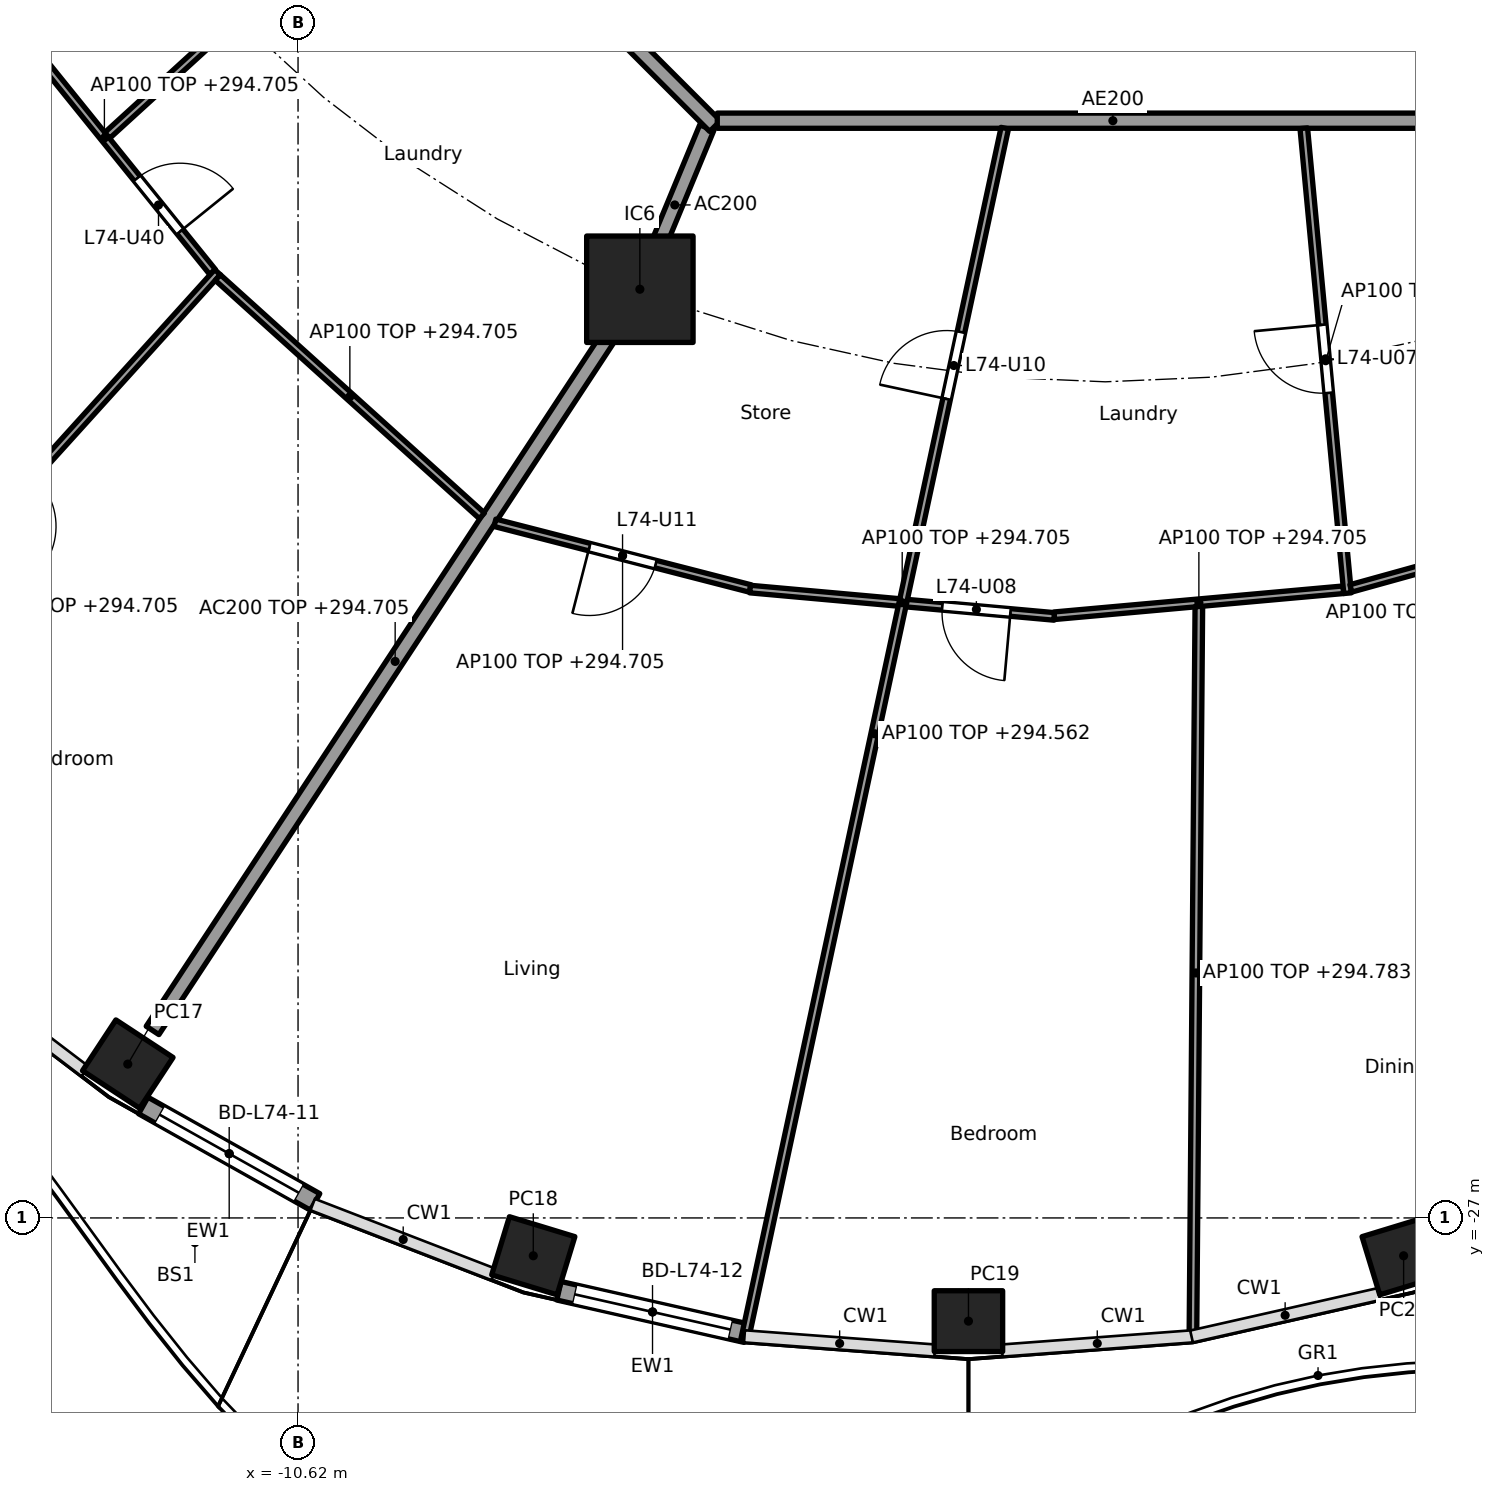
"""IFC4 building model, lengths in metres.
Left out: names, types, materials, properties, quantities, classifications, styles, units other than length and angle.
Written with IfcOpenShell. Run it as: python <this file> out.ifc"""

import sys

from ifc_helpers import new_model, si_unit, direction, frame, frame_2d, origin, origin_2d, place, context, subcontext, project, spatial, rectangle, hollow_rectangle, extrude, element, fill, save


model = new_model("IFC4")
c1 = context("Model", 3, precision=1e-05, world=origin(), true_north=direction((0.0, 1.0)))
c2 = subcontext(c1, "Body", "Model", "MODEL_VIEW")
j1 = project(units=[si_unit("LENGTHUNIT", "METRE"), si_unit("PLANEANGLEUNIT", "RADIAN")], contexts=[c1])
p1 = place(None, origin())
s1 = spatial("IfcSite", under=j1, at=p1, CompositionType="ELEMENT")
p2 = place(p1, origin())
s2 = spatial("IfcBuilding", under=s1, at=p2, CompositionType="ELEMENT")
p3 = place(p2, frame((0.0, 0.0, 291.8)))
s3 = spatial("IfcBuildingStorey", under=s2, at=p3, CompositionType="ELEMENT", Elevation=291.8)
for number, where, z_axis, x_axis in (
    (1, (-12.86, -24.976, 0.0), (0.0, 0.0, 1.0), (0.836, -0.549, 0.0)),
    (2, (-7.525, -27.498, 0.0), (0.0, 0.0, 1.0), (0.957, -0.292, 0.0)),
    (3, (-1.8, -28.358, 0.0), (0.0, 0.0, 1.0), (1.0, 0.0, 0.0)),
    (4, (3.925, -27.498, 0.0), (0.0, 0.0, 1.0), (0.957, 0.292, 0.0)),
):
    element("IfcColumn", number, at=place(p3, frame(where, z_axis=z_axis, x_axis=x_axis)), inside=s3, PredefinedType="COLUMN", context=c2, shape_type="SweptSolid", body=[
        extrude(hollow_rectangle(XDim=0.9, YDim=0.8, WallThickness=0.028, at=origin_2d()), origin(), (0.0, 0.0, 1.0), 3.7),
    ])
p4 = place(p3, frame((-6.123, -14.782, 0.0), z_axis=(0.0, 0.0, 1.0), x_axis=(1.0, 0.0, 0.0)))
e5 = element("IfcColumn", 5, at=p4, inside=s3, PredefinedType="COLUMN", context=c2, shape_type="SweptSolid", body=[
    extrude(rectangle(XDim=1.4, YDim=1.4, at=origin_2d()), origin(), (0.0, 0.0, 1.0), 3.7),
])
p5 = place(p3, frame((-10.395, -26.789, 0.0), z_axis=(0.0, 0.0, 1.0), x_axis=(-0.872115604046, 0.489299880625, 0.0)))
e6 = element("IfcWall", 6, at=p5, inside=s3, PredefinedType="SOLIDWALL", context=c2, shape_type="SweptSolid", body=[
    extrude(rectangle(XDim=2.593, YDim=0.25, at=frame_2d((1.296, 0.0))), origin(), (0.0, 0.0, 1.0), 3.44),
])
p6 = place(p5, frame((0.247, 0.0, 0.0)))
e7 = element("IfcOpeningElement", 7, at=p6, cuts=e6, PredefinedType="OPENING", context=c2, shape_type="SweptSolid", body=[
    extrude(rectangle(XDim=2.1, YDim=2.4, at=frame_2d((1.05, 1.2))), frame((0.0, 0.135, 0.0), z_axis=(0.0, -1.0, 0.0), x_axis=(1.0, 0.0, 0.0)), (0.0, 0.0, 1.0), 0.27),
])
p7 = place(p3, frame((-4.725, -28.516, 0.0), z_axis=(0.0, 0.0, 1.0), x_axis=(-0.975319584032, 0.220797891756, 0.0)))
e8 = element("IfcWall", 8, at=p7, inside=s3, PredefinedType="SOLIDWALL", context=c2, shape_type="SweptSolid", body=[
    extrude(rectangle(XDim=2.525, YDim=0.25, at=frame_2d((1.263, 0.0))), origin(), (0.0, 0.0, 1.0), 3.44),
])
p8 = place(p7, frame((0.213, 0.0, 0.0)))
e9 = element("IfcOpeningElement", 9, at=p8, cuts=e8, PredefinedType="OPENING", context=c2, shape_type="SweptSolid", body=[
    extrude(rectangle(XDim=2.1, YDim=2.4, at=frame_2d((1.05, 1.2))), frame((0.0, 0.135, 0.0), z_axis=(0.0, -1.0, 0.0), x_axis=(1.0, 0.0, 0.0)), (0.0, 0.0, 1.0), 0.27),
])
p9 = place(p3, frame((-5.243, -12.657, 0.0), z_axis=(0.0, 0.0, 1.0), x_axis=(-0.382770106157, -0.923843626288, 0.0)))
e10 = element("IfcWall", 10, at=p9, inside=s3, PredefinedType="PARTITIONING", context=c2, shape_type="SweptSolid", body=[
    extrude(rectangle(XDim=2.199, YDim=0.2, at=frame_2d((1.1, 0.0))), origin(), (0.0, 0.0, 1.0), 3.44),
])
p10 = place(p3, frame((-6.151, -14.824, 0.0), z_axis=(0.0, 0.0, 1.0), x_axis=(-0.549345577828, -0.835595258556, 0.0)))
e11 = element("IfcWall", 11, at=p10, inside=s3, PredefinedType="PARTITIONING", context=c2, shape_type="SweptSolid", body=[
    extrude(rectangle(XDim=11.62, YDim=0.2, at=frame_2d((5.81, 0.0))), origin(), (0.0, 0.0, 1.0), 2.905),
])
p11 = place(p3, frame((-12.635, -5.134, 0.0), z_axis=(0.0, 0.0, 1.0), x_axis=(0.707106781187, -0.707106781187, 0.0)))
e12 = element("IfcWall", 12, at=p11, inside=s3, PredefinedType="PARTITIONING", context=c2, shape_type="SweptSolid", body=[
    extrude(rectangle(XDim=10.609, YDim=0.2, at=frame_2d((5.305, 0.0))), origin(), (0.0, 0.0, 1.0), 3.44),
])
p12 = place(p3, frame((-5.104, -12.565, 0.0), z_axis=(0.0, 0.0, 1.0), x_axis=(1.0, 0.0, 0.0)))
e13 = element("IfcWall", 13, at=p12, inside=s3, PredefinedType="PARTITIONING", context=c2, shape_type="SweptSolid", body=[
    extrude(rectangle(XDim=10.409, YDim=0.2, at=frame_2d((5.205, 0.0))), origin(), (0.0, 0.0, 1.0), 3.44),
])
p13 = place(p3, frame((-14.591, -11.029, 0.0), z_axis=(0.0, 0.0, 1.0), x_axis=(0.628170338674, -0.778075848237, 0.0)))
e14 = element("IfcWall", 14, at=p13, inside=s3, PredefinedType="PARTITIONING", context=c2, shape_type="SweptSolid", body=[
    extrude(rectangle(XDim=4.532, YDim=0.1, at=frame_2d((2.266, 0.0))), origin(), (0.0, 0.0, 1.0), 2.905),
])
p14 = place(p13, frame((2.949, 0.0, 0.0)))
e15 = element("IfcOpeningElement", 15, at=p14, cuts=e14, PredefinedType="OPENING", context=c2, shape_type="SweptSolid", body=[
    extrude(rectangle(XDim=0.9, YDim=2.1, at=frame_2d((0.45, 1.05))), frame((0.0, 0.06, 0.0), z_axis=(0.0, -1.0, 0.0), x_axis=(1.0, 0.0, 0.0)), (0.0, 0.0, 1.0), 0.12),
])
p15 = place(p3, frame((-8.958, -8.952, 0.0), z_axis=(0.0, 0.0, 1.0), x_axis=(-0.73876526954, -0.673962815385, 0.0)))
e16 = element("IfcWall", 16, at=p15, inside=s3, PredefinedType="PARTITIONING", context=c2, shape_type="SweptSolid", body=[
    extrude(rectangle(XDim=5.647, YDim=0.1, at=frame_2d((2.824, 0.0))), origin(), (0.0, 0.0, 1.0), 2.762),
])
p16 = place(p3, frame((-11.679, -14.557, 0.0), z_axis=(0.0, 0.0, 1.0), x_axis=(-0.670800011545, -0.741638284146, 0.0)))
e17 = element("IfcWall", 17, at=p16, inside=s3, PredefinedType="PARTITIONING", context=c2, shape_type="SweptSolid", body=[
    extrude(rectangle(XDim=8.068, YDim=0.1, at=frame_2d((4.034, 0.0))), origin(), (0.0, 0.0, 1.0), 2.905),
])
p17 = place(p16, frame((3.609, 0.0, 0.0)))
e18 = element("IfcOpeningElement", 18, at=p17, cuts=e17, PredefinedType="OPENING", context=c2, shape_type="SweptSolid", body=[
    extrude(rectangle(XDim=0.9, YDim=2.1, at=frame_2d((0.45, 1.05))), frame((0.0, 0.06, 0.0), z_axis=(0.0, -1.0, 0.0), x_axis=(1.0, 0.0, 0.0)), (0.0, 0.0, 1.0), 0.12),
])
p18 = place(p3, frame((-11.676, -14.628, 0.0), z_axis=(0.0, 0.0, 1.0), x_axis=(0.74245829867, -0.669892285921, 0.0)))
e19 = element("IfcWall", 19, at=p18, inside=s3, PredefinedType="PARTITIONING", context=c2, shape_type="SweptSolid", body=[
    extrude(rectangle(XDim=4.68, YDim=0.1, at=frame_2d((2.34, 0.0))), origin(), (0.0, 0.0, 1.0), 2.905),
])
p19 = place(p3, frame((-8.03, -17.854, 0.0), z_axis=(0.0, 0.0, 1.0), x_axis=(0.968441967324, -0.249239154077, 0.0)))
e20 = element("IfcWall", 20, at=p19, inside=s3, PredefinedType="PARTITIONING", context=c2, shape_type="SweptSolid", body=[
    extrude(rectangle(XDim=3.468, YDim=0.1, at=frame_2d((1.734, 0.0))), origin(), (0.0, 0.0, 1.0), 2.905),
])
p20 = place(p19, frame((1.284, 0.0, 0.0)))
e21 = element("IfcOpeningElement", 21, at=p20, cuts=e20, PredefinedType="OPENING", context=c2, shape_type="SweptSolid", body=[
    extrude(rectangle(XDim=0.9, YDim=2.1, at=frame_2d((0.45, 1.05))), frame((0.0, 0.06, 0.0), z_axis=(0.0, -1.0, 0.0), x_axis=(1.0, 0.0, 0.0)), (0.0, 0.0, 1.0), 0.12),
])
p21 = place(p3, frame((-4.673, -18.727, 0.0), z_axis=(0.0, 0.0, 1.0), x_axis=(0.995982840882, -0.089544294447, 0.0)))
e22 = element("IfcWall", 22, at=p21, inside=s3, PredefinedType="PARTITIONING", context=c2, shape_type="SweptSolid", body=[
    extrude(rectangle(XDim=4.019, YDim=0.1, at=frame_2d((2.009, 0.0))), origin(), (0.0, 0.0, 1.0), 2.905),
])
p22 = place(p21, frame((2.539, 0.0, 0.0)))
e23 = element("IfcOpeningElement", 23, at=p22, cuts=e22, PredefinedType="OPENING", context=c2, shape_type="SweptSolid", body=[
    extrude(rectangle(XDim=0.9, YDim=2.1, at=frame_2d((0.45, 1.05))), frame((0.0, 0.06, 0.0), z_axis=(0.0, -1.0, 0.0), x_axis=(1.0, 0.0, 0.0)), (0.0, 0.0, 1.0), 0.12),
])
p23 = place(p3, frame((-1.322, -12.663, 0.0), z_axis=(0.0, 0.0, 1.0), x_axis=(-0.209957681159, -0.97771047459, 0.0)))
e24 = element("IfcWall", 24, at=p23, inside=s3, PredefinedType="PARTITIONING", context=c2, shape_type="SweptSolid", body=[
    extrude(rectangle(XDim=16.299, YDim=0.1, at=frame_2d((8.149, 0.0))), origin(), (0.0, 0.0, 1.0), 2.762),
])
p24 = place(p23, frame((2.744, 0.0, 0.0)))
e25 = element("IfcOpeningElement", 25, at=p24, cuts=e24, PredefinedType="OPENING", context=c2, shape_type="SweptSolid", body=[
    extrude(rectangle(XDim=0.9, YDim=2.1, at=frame_2d((0.45, 1.05))), frame((0.0, 0.06, 0.0), z_axis=(0.0, -1.0, 0.0), x_axis=(1.0, 0.0, 0.0)), (0.0, 0.0, 1.0), 0.12),
])
p25 = place(p3, frame((-0.67, -19.077, 0.0), z_axis=(0.0, 0.0, 1.0), x_axis=(0.995986472869, 0.089503887414, 0.0)))
e26 = element("IfcWall", 26, at=p25, inside=s3, PredefinedType="PARTITIONING", context=c2, shape_type="SweptSolid", body=[
    extrude(rectangle(XDim=3.819, YDim=0.1, at=frame_2d((1.909, 0.0))), origin(), (0.0, 0.0, 1.0), 2.905),
])
p26 = place(p3, frame((1.231, -18.957, 0.0), z_axis=(0.0, 0.0, 1.0), x_axis=(-0.008128577452, -0.999966962569, 0.0)))
e27 = element("IfcWall", 27, at=p26, inside=s3, PredefinedType="PARTITIONING", context=c2, shape_type="SweptSolid", body=[
    extrude(rectangle(XDim=9.641, YDim=0.1, at=frame_2d((4.821, 0.0))), origin(), (0.0, 0.0, 1.0), 2.983),
])
p27 = place(p3, frame((2.612, -12.664, 0.0), z_axis=(0.0, 0.0, 1.0), x_axis=(0.093781393779, -0.995592813444, 0.0)))
e28 = element("IfcWall", 28, at=p27, inside=s3, PredefinedType="PARTITIONING", context=c2, shape_type="SweptSolid", body=[
    extrude(rectangle(XDim=6.144, YDim=0.1, at=frame_2d((3.072, 0.0))), origin(), (0.0, 0.0, 1.0), 2.762),
])
p28 = place(p27, frame((2.597, 0.0, 0.0)))
e29 = element("IfcOpeningElement", 29, at=p28, cuts=e28, PredefinedType="OPENING", context=c2, shape_type="SweptSolid", body=[
    extrude(rectangle(XDim=0.9, YDim=2.1, at=frame_2d((0.45, 1.05))), frame((0.0, 0.06, 0.0), z_axis=(0.0, -1.0, 0.0), x_axis=(1.0, 0.0, 0.0)), (0.0, 0.0, 1.0), 0.12),
])
p29 = place(p3, frame((3.231, -18.718, 0.0), z_axis=(0.0, 0.0, 1.0), x_axis=(0.963601204771, 0.267343820136, 0.0)))
e30 = element("IfcWall", 30, at=p29, inside=s3, PredefinedType="PARTITIONING", context=c2, shape_type="SweptSolid", body=[
    extrude(rectangle(XDim=3.903, YDim=0.1, at=frame_2d((1.952, 0.0))), origin(), (0.0, 0.0, 1.0), 2.905),
])
p30 = place(p6, origin())
e31 = element("IfcDoor", 31, at=p30, inside=s3, OperationType="SLIDING_TO_LEFT", PredefinedType="DOOR", context=c2, shape_type="SweptSolid", body=[
    extrude(rectangle(XDim=2.1, YDim=2.4, at=frame_2d((1.05, 1.2))), frame((0.0, 0.025, 0.0), z_axis=(0.0, -1.0, 0.0), x_axis=(1.0, 0.0, 0.0)), (0.0, 0.0, 1.0), 0.05),
])
fill(e7, e31)
p31 = place(p8, origin())
e32 = element("IfcDoor", 32, at=p31, inside=s3, OperationType="SLIDING_TO_LEFT", PredefinedType="DOOR", context=c2, shape_type="SweptSolid", body=[
    extrude(rectangle(XDim=2.1, YDim=2.4, at=frame_2d((1.05, 1.2))), frame((0.0, 0.025, 0.0), z_axis=(0.0, -1.0, 0.0), x_axis=(1.0, 0.0, 0.0)), (0.0, 0.0, 1.0), 0.05),
])
fill(e9, e32)
p32 = place(p28, frame((0.9, 0.0, 0.0), x_axis=(-1.0, 0.0, 0.0)))
e33 = element("IfcDoor", 33, at=p32, inside=s3, OperationType="SINGLE_SWING_RIGHT", PredefinedType="DOOR", context=c2, shape_type="SweptSolid", body=[
    extrude(rectangle(XDim=0.9, YDim=2.1, at=frame_2d((0.45, 1.05))), frame((0.0, 0.025, 0.0), z_axis=(0.0, -1.0, 0.0), x_axis=(1.0, 0.0, 0.0)), (0.0, 0.0, 1.0), 0.05),
])
fill(e29, e33)
p33 = place(p22, frame((0.9, 0.0, 0.0), x_axis=(-1.0, 0.0, 0.0)))
e34 = element("IfcDoor", 34, at=p33, inside=s3, OperationType="SINGLE_SWING_LEFT", PredefinedType="DOOR", context=c2, shape_type="SweptSolid", body=[
    extrude(rectangle(XDim=0.9, YDim=2.1, at=frame_2d((0.45, 1.05))), frame((0.0, 0.025, 0.0), z_axis=(0.0, -1.0, 0.0), x_axis=(1.0, 0.0, 0.0)), (0.0, 0.0, 1.0), 0.05),
])
fill(e23, e34)
p34 = place(p24, frame((0.9, 0.0, 0.0), x_axis=(-1.0, 0.0, 0.0)))
e35 = element("IfcDoor", 35, at=p34, inside=s3, OperationType="SINGLE_SWING_LEFT", PredefinedType="DOOR", context=c2, shape_type="SweptSolid", body=[
    extrude(rectangle(XDim=0.9, YDim=2.1, at=frame_2d((0.45, 1.05))), frame((0.0, 0.025, 0.0), z_axis=(0.0, -1.0, 0.0), x_axis=(1.0, 0.0, 0.0)), (0.0, 0.0, 1.0), 0.05),
])
fill(e25, e35)
p35 = place(p20, frame((0.9, 0.0, 0.0), x_axis=(-1.0, 0.0, 0.0)))
e36 = element("IfcDoor", 36, at=p35, inside=s3, OperationType="SINGLE_SWING_RIGHT", PredefinedType="DOOR", context=c2, shape_type="SweptSolid", body=[
    extrude(rectangle(XDim=0.9, YDim=2.1, at=frame_2d((0.45, 1.05))), frame((0.0, 0.025, 0.0), z_axis=(0.0, -1.0, 0.0), x_axis=(1.0, 0.0, 0.0)), (0.0, 0.0, 1.0), 0.05),
])
fill(e21, e36)
p36 = place(p14, origin())
e37 = element("IfcDoor", 37, at=p36, inside=s3, OperationType="SINGLE_SWING_RIGHT", PredefinedType="DOOR", context=c2, shape_type="SweptSolid", body=[
    extrude(rectangle(XDim=0.9, YDim=2.1, at=frame_2d((0.45, 1.05))), frame((0.0, 0.025, 0.0), z_axis=(0.0, -1.0, 0.0), x_axis=(1.0, 0.0, 0.0)), (0.0, 0.0, 1.0), 0.05),
])
fill(e15, e37)
save(model, sys.argv[1])
